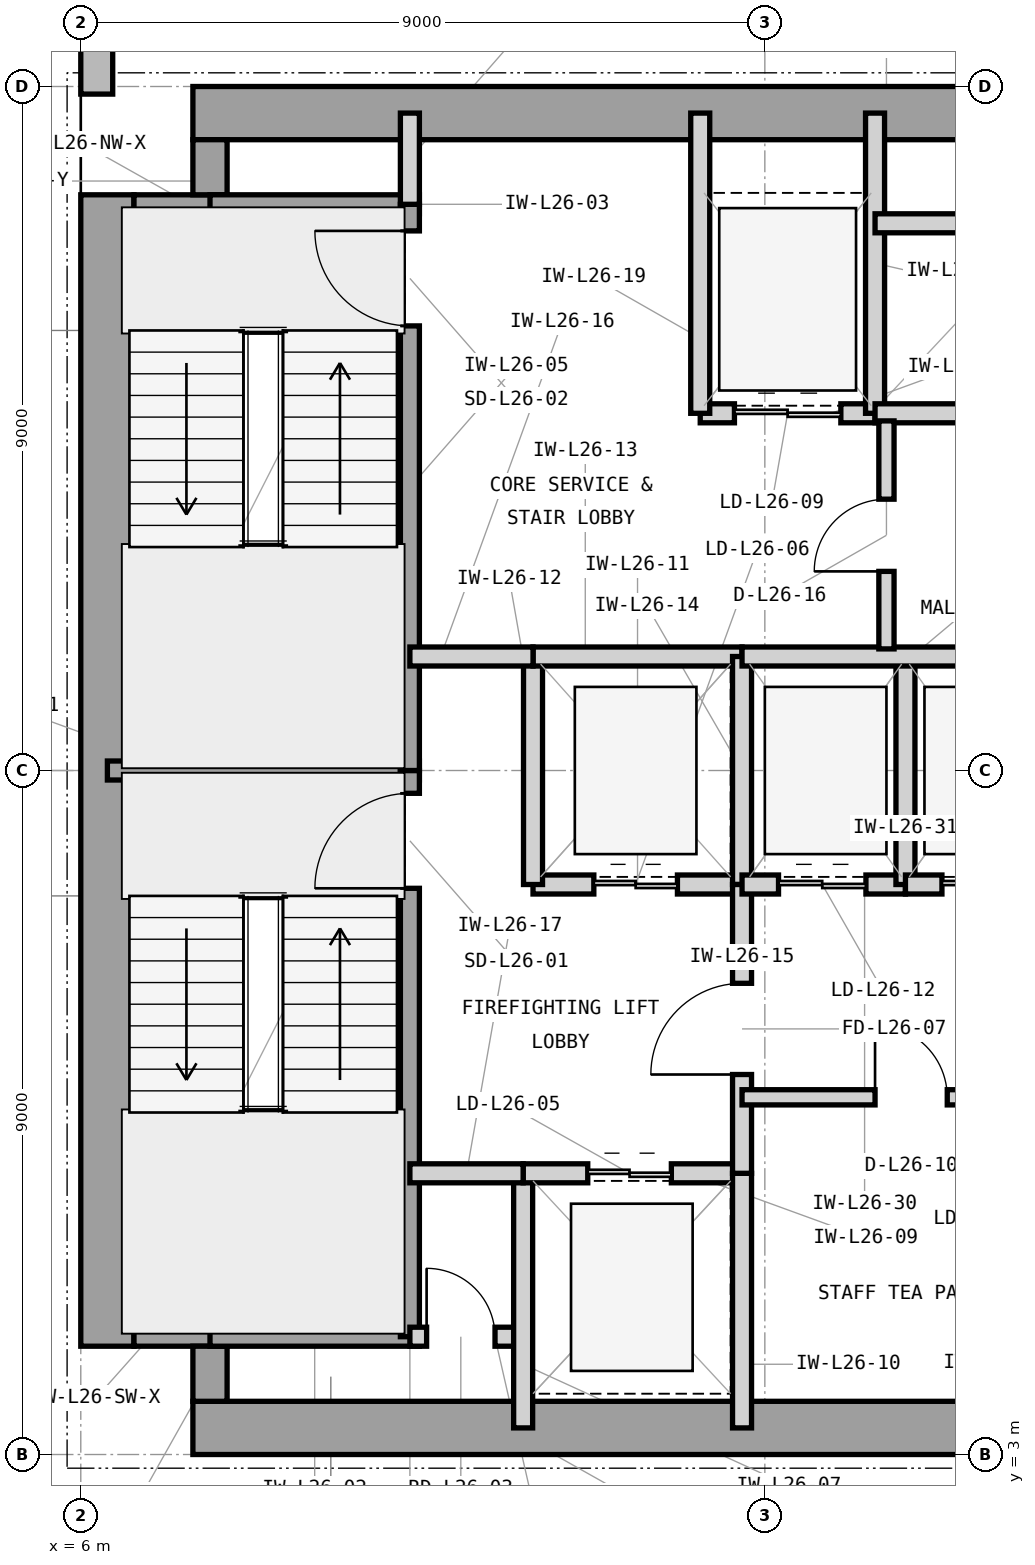
"""IFC4 building model, lengths in metres.
Left out: names, types, materials, properties, quantities, classifications, styles, units other than length and angle.
Written with IfcOpenShell. Run it as: python <this file> out.ifc"""

import sys

from ifc_helpers import new_model, si_unit, direction, frame, frame_2d, origin, place, context, subcontext, project, spatial, rectangle, extrude, element, fill, save


model = new_model("IFC4")
c1 = context("Model", 3, precision=1e-05, world=origin(), true_north=direction((0.0, 1.0)))
c2 = subcontext(c1, "Body", "Model", "MODEL_VIEW")
j1 = project(units=[si_unit("LENGTHUNIT", "METRE"), si_unit("PLANEANGLEUNIT", "RADIAN")], contexts=[c1])
p1 = place(None, origin())
s1 = spatial("IfcSite", under=j1, at=p1, CompositionType="ELEMENT")
p2 = place(p1, origin())
s2 = spatial("IfcBuilding", under=s1, at=p2, CompositionType="ELEMENT")
p3 = place(p2, frame((0.0, 0.0, 112.8)))
s3 = spatial("IfcBuildingStorey", under=s2, at=p3, CompositionType="ELEMENT", Elevation=112.8)
p4 = place(p3, frame((7.475, 3.35, 0.0), z_axis=(0.0, 0.0, 1.0), x_axis=(1.0, 0.0, 0.0)))
e1 = element("IfcWall", 1, at=p4, inside=s3, PredefinedType="SHEAR", context=c2, shape_type="SweptSolid", body=[
    extrude(rectangle(XDim=16.525, YDim=0.7, at=frame_2d((8.262, 0.0))), origin(), (0.0, 0.0, 1.0), 3.9),
])
p5 = place(p3, frame((6.35, 4.425, 0.0), z_axis=(0.0, 0.0, 1.0), x_axis=(0.0, 1.0, 0.0)))
e2 = element("IfcWall", 2, at=p5, inside=s3, PredefinedType="SHEAR", context=c2, shape_type="SweptSolid", body=[
    extrude(rectangle(XDim=15.15, YDim=0.7, at=frame_2d((7.575, 0.0))), origin(), (0.0, 0.0, 1.0), 3.9),
])
p6 = place(p3, frame((7.475, 20.65, 0.0), z_axis=(0.0, 0.0, 1.0), x_axis=(1.0, 0.0, 0.0)))
e3 = element("IfcWall", 3, at=p6, inside=s3, PredefinedType="SHEAR", context=c2, shape_type="SweptSolid", body=[
    extrude(rectangle(XDim=12.325, YDim=0.7, at=frame_2d((6.163, 0.0))), origin(), (0.0, 0.0, 1.0), 3.9),
])
p7 = place(p3, frame((6.7, 4.65, 0.0), z_axis=(0.0, 0.0, 1.0), x_axis=(1.0, 0.0, 0.0)))
e4 = element("IfcWall", 4, at=p7, inside=s3, PredefinedType="SHEAR", context=c2, shape_type="SweptSolid", body=[
    extrude(rectangle(XDim=1.225, YDim=0.45, at=frame_2d((0.613, 0.0))), origin(), (0.0, 0.0, 1.0), 3.9),
])
p8 = place(p3, frame((7.7, 3.7, 0.0), z_axis=(0.0, 0.0, 1.0), x_axis=(0.0, 1.0, 0.0)))
e5 = element("IfcWall", 5, at=p8, inside=s3, PredefinedType="SHEAR", context=c2, shape_type="SweptSolid", body=[
    extrude(rectangle(XDim=0.725, YDim=0.45, at=frame_2d((0.363, 0.0))), origin(), (0.0, 0.0, 1.0), 3.9),
])
p9 = place(p3, frame((6.7, 19.35, 0.0), z_axis=(0.0, 0.0, 1.0), x_axis=(1.0, 0.0, 0.0)))
e6 = element("IfcWall", 6, at=p9, inside=s3, PredefinedType="SHEAR", context=c2, shape_type="SweptSolid", body=[
    extrude(rectangle(XDim=1.225, YDim=0.45, at=frame_2d((0.613, 0.0))), origin(), (0.0, 0.0, 1.0), 3.9),
])
p10 = place(p3, frame((7.7, 19.575, 0.0), z_axis=(0.0, 0.0, 1.0), x_axis=(0.0, 1.0, 0.0)))
e7 = element("IfcWall", 7, at=p10, inside=s3, PredefinedType="SHEAR", context=c2, shape_type="SweptSolid", body=[
    extrude(rectangle(XDim=0.725, YDim=0.45, at=frame_2d((0.363, 0.0))), origin(), (0.0, 0.0, 1.0), 3.9),
])
p11 = place(p3, frame((6.21, 46.4, 0.0), z_axis=(0.0, 0.0, 1.0), x_axis=(0.0, -1.0, 0.0)))
e8 = element("IfcWall", 8, at=p11, inside=s3, PredefinedType="STANDARD", context=c2, shape_type="SweptSolid", body=[
    extrude(rectangle(XDim=25.5, YDim=0.42, at=frame_2d((12.75, 0.0))), origin(), (0.0, 0.0, 1.0), 3.7),
])
p12 = place(p11, frame((11.5, 0.0, 0.85)))
e9 = element("IfcOpeningElement", 9, at=p12, cuts=e8, PredefinedType="OPENING", context=c2, shape_type="SweptSolid", body=[
    extrude(rectangle(XDim=2.5, YDim=2.25, at=frame_2d((1.25, 1.125))), frame((0.0, 0.22, 0.0), z_axis=(0.0, -1.0, 0.0), x_axis=(1.0, 0.0, 0.0)), (0.0, 0.0, 1.0), 0.44),
])
p13 = place(p11, frame((8.336, 0.0, 0.85)))
e10 = element("IfcOpeningElement", 10, at=p13, cuts=e8, PredefinedType="OPENING", context=c2, shape_type="SweptSolid", body=[
    extrude(rectangle(XDim=1.2, YDim=2.25, at=frame_2d((0.6, 1.125))), frame((0.0, 0.22, 0.0), z_axis=(0.0, -1.0, 0.0), x_axis=(1.0, 0.0, 0.0)), (0.0, 0.0, 1.0), 0.44),
])
p14 = place(p3, frame((6.35, 12.0, 0.0), z_axis=(0.0, 0.0, 1.0), x_axis=(1.0, 0.0, 0.0)))
e11 = element("IfcWall", 11, at=p14, inside=s3, PredefinedType="SHEAR", context=c2, shape_type="SweptSolid", body=[
    extrude(rectangle(XDim=4.105, YDim=0.25, at=frame_2d((2.052, 0.0))), origin(), (0.0, 0.0, 1.0), 3.9),
])
for number, where, z_axis, x_axis in (
    (12, (7.7, 4.55, 0.0), (0.0, 0.0, 1.0), (1.0, 0.0, 0.0)),
    (13, (7.7, 19.45, 0.0), (0.0, 0.0, 1.0), (1.0, 0.0, 0.0)),
):
    element("IfcWall", number, at=place(p3, frame(where, z_axis=z_axis, x_axis=x_axis)), inside=s3, PredefinedType="SHEAR", context=c2, shape_type="SweptSolid", body=[
        extrude(rectangle(XDim=2.755, YDim=0.25, at=frame_2d((1.377, 0.0))), origin(), (0.0, 0.0, 1.0), 3.9),
    ])
p15 = place(p3, frame((10.33, 4.55, 0.0), z_axis=(0.0, 0.0, 1.0), x_axis=(0.0, 1.0, 0.0)))
e14 = element("IfcWall", 14, at=p15, inside=s3, PredefinedType="SHEAR", context=c2, shape_type="SweptSolid", body=[
    extrude(rectangle(XDim=7.45, YDim=0.25, at=frame_2d((3.725, 0.0))), origin(), (0.0, 0.0, 1.0), 3.9),
])
p16 = place(p15, frame((5.9, 0.0, 0.0)))
e15 = element("IfcOpeningElement", 15, at=p16, cuts=e14, PredefinedType="OPENING", context=c2, shape_type="SweptSolid", body=[
    extrude(rectangle(XDim=1.25, YDim=2.2, at=frame_2d((0.625, 1.1))), frame((0.0, 0.135, 0.0), z_axis=(0.0, -1.0, 0.0), x_axis=(1.0, 0.0, 0.0)), (0.0, 0.0, 1.0), 0.27),
])
p17 = place(p3, frame((10.33, 12.0, 0.0), z_axis=(0.0, 0.0, 1.0), x_axis=(0.0, 1.0, 0.0)))
e16 = element("IfcWall", 16, at=p17, inside=s3, PredefinedType="SHEAR", context=c2, shape_type="SweptSolid", body=[
    extrude(rectangle(XDim=7.45, YDim=0.25, at=frame_2d((3.725, 0.0))), origin(), (0.0, 0.0, 1.0), 3.9),
])
p18 = place(p17, frame((5.85, 0.0, 0.0)))
e17 = element("IfcOpeningElement", 17, at=p18, cuts=e16, PredefinedType="OPENING", context=c2, shape_type="SweptSolid", body=[
    extrude(rectangle(XDim=1.25, YDim=2.2, at=frame_2d((0.625, 1.1))), frame((0.0, 0.135, 0.0), z_axis=(0.0, -1.0, 0.0), x_axis=(1.0, 0.0, 0.0)), (0.0, 0.0, 1.0), 0.27),
])
p19 = place(p3, frame((10.33, 4.55, 0.0), z_axis=(0.0, 0.0, 1.0), x_axis=(1.0, 0.0, 0.0)))
e18 = element("IfcWall", 18, at=p19, inside=s3, PredefinedType="PARTITIONING", context=c2, shape_type="SweptSolid", body=[
    extrude(rectangle(XDim=1.49, YDim=0.25, at=frame_2d((0.745, 0.0))), origin(), (0.0, 0.0, 1.0), 3.69),
])
p20 = place(p19, frame((0.22, 0.0, 0.0)))
e19 = element("IfcOpeningElement", 19, at=p20, cuts=e18, PredefinedType="OPENING", context=c2, shape_type="SweptSolid", body=[
    extrude(rectangle(XDim=0.9, YDim=2.1, at=frame_2d((0.45, 1.05))), frame((0.0, 0.135, 0.0), z_axis=(0.0, -1.0, 0.0), x_axis=(1.0, 0.0, 0.0)), (0.0, 0.0, 1.0), 0.27),
])
p21 = place(p3, frame((11.82, 3.35, 0.0), z_axis=(0.0, 0.0, 1.0), x_axis=(0.0, 1.0, 0.0)))
e20 = element("IfcWall", 20, at=p21, inside=s3, PredefinedType="PARTITIONING", context=c2, shape_type="SweptSolid", body=[
    extrude(rectangle(XDim=3.35, YDim=0.25, at=frame_2d((1.675, 0.0))), origin(), (0.0, 0.0, 1.0), 3.69),
])
p22 = place(p3, frame((10.33, 19.45, 0.0), z_axis=(0.0, 0.0, 1.0), x_axis=(0.0, 1.0, 0.0)))
e21 = element("IfcWall", 21, at=p22, inside=s3, PredefinedType="PARTITIONING", context=c2, shape_type="SweptSolid", body=[
    extrude(rectangle(XDim=1.2, YDim=0.25, at=frame_2d((0.6, 0.0))), origin(), (0.0, 0.0, 1.0), 2.917),
])
p23 = place(p3, frame((11.82, 6.7, 0.0), z_axis=(0.0, 0.0, 1.0), x_axis=(1.0, 0.0, 0.0)))
e22 = element("IfcWall", 22, at=p23, inside=s3, PredefinedType="PARTITIONING", context=c2, shape_type="SweptSolid", body=[
    extrude(rectangle(XDim=2.88, YDim=0.25, at=frame_2d((1.44, 0.0))), origin(), (0.0, 0.0, 1.0), 3.227),
])
p24 = place(p23, frame((0.85, 0.0, 0.0)))
e23 = element("IfcOpeningElement", 23, at=p24, cuts=e22, PredefinedType="OPENING", context=c2, shape_type="SweptSolid", body=[
    extrude(rectangle(XDim=1.1, YDim=2.25, at=frame_2d((0.55, 1.125))), frame((0.0, 0.135, 0.0), z_axis=(0.0, -1.0, 0.0), x_axis=(1.0, 0.0, 0.0)), (0.0, 0.0, 1.0), 0.27),
])
p25 = place(p3, frame((14.7, 3.35, 0.0), z_axis=(0.0, 0.0, 1.0), x_axis=(0.0, 1.0, 0.0)))
e24 = element("IfcWall", 24, at=p25, inside=s3, PredefinedType="PARTITIONING", context=c2, shape_type="SweptSolid", body=[
    extrude(rectangle(XDim=3.35, YDim=0.25, at=frame_2d((1.675, 0.0))), origin(), (0.0, 0.0, 1.0), 3.69),
])
p26 = place(p3, frame((11.95, 10.5, 0.0), z_axis=(0.0, 0.0, 1.0), x_axis=(1.0, 0.0, 0.0)))
e25 = element("IfcWall", 25, at=p26, inside=s3, PredefinedType="PARTITIONING", context=c2, shape_type="SweptSolid", body=[
    extrude(rectangle(XDim=2.75, YDim=0.25, at=frame_2d((1.375, 0.0))), origin(), (0.0, 0.0, 1.0), 3.227),
])
p27 = place(p26, frame((0.8, 0.0, 0.0)))
e26 = element("IfcOpeningElement", 26, at=p27, cuts=e25, PredefinedType="OPENING", context=c2, shape_type="SweptSolid", body=[
    extrude(rectangle(XDim=1.1, YDim=2.25, at=frame_2d((0.55, 1.125))), frame((0.0, 0.135, 0.0), z_axis=(0.0, -1.0, 0.0), x_axis=(1.0, 0.0, 0.0)), (0.0, 0.0, 1.0), 0.27),
])
p28 = place(p3, frame((11.95, 10.5, 0.0), z_axis=(0.0, 0.0, 1.0), x_axis=(0.0, 1.0, 0.0)))
e27 = element("IfcWall", 27, at=p28, inside=s3, PredefinedType="PARTITIONING", context=c2, shape_type="SweptSolid", body=[
    extrude(rectangle(XDim=3.0, YDim=0.25, at=frame_2d((1.5, 0.0))), origin(), (0.0, 0.0, 1.0), 3.69),
])
p29 = place(p3, frame((11.95, 13.5, 0.0), z_axis=(0.0, 0.0, 1.0), x_axis=(1.0, 0.0, 0.0)))
e28 = element("IfcWall", 28, at=p29, inside=s3, PredefinedType="PARTITIONING", context=c2, shape_type="SweptSolid", body=[
    extrude(rectangle(XDim=2.75, YDim=0.25, at=frame_2d((1.375, 0.0))), origin(), (0.0, 0.0, 1.0), 3.227),
])
p30 = place(p3, frame((14.7, 10.5, 0.0), z_axis=(0.0, 0.0, 1.0), x_axis=(0.0, 1.0, 0.0)))
e29 = element("IfcWall", 29, at=p30, inside=s3, PredefinedType="PARTITIONING", context=c2, shape_type="SweptSolid", body=[
    extrude(rectangle(XDim=3.0, YDim=0.25, at=frame_2d((1.5, 0.0))), origin(), (0.0, 0.0, 1.0), 3.69),
])
p31 = place(p3, frame((14.7, 6.7, 0.0), z_axis=(0.0, 0.0, 1.0), x_axis=(0.0, 1.0, 0.0)))
e30 = element("IfcWall", 30, at=p31, inside=s3, PredefinedType="PARTITIONING", context=c2, shape_type="SweptSolid", body=[
    extrude(rectangle(XDim=3.8, YDim=0.25, at=frame_2d((1.9, 0.0))), origin(), (0.0, 0.0, 1.0), 3.69),
])
p32 = place(p31, frame((1.3, 0.0, 0.0)))
e31 = element("IfcOpeningElement", 31, at=p32, cuts=e30, PredefinedType="OPENING", context=c2, shape_type="SweptSolid", body=[
    extrude(rectangle(XDim=1.2, YDim=2.2, at=frame_2d((0.6, 1.1))), frame((0.0, 0.135, 0.0), z_axis=(0.0, -1.0, 0.0), x_axis=(1.0, 0.0, 0.0)), (0.0, 0.0, 1.0), 0.27),
])
p33 = place(p3, frame((10.33, 13.5, 0.0), z_axis=(0.0, 0.0, 1.0), x_axis=(1.0, 0.0, 0.0)))
e32 = element("IfcWall", 32, at=p33, inside=s3, PredefinedType="PARTITIONING", context=c2, shape_type="SweptSolid", body=[
    extrude(rectangle(XDim=1.62, YDim=0.25, at=frame_2d((0.81, 0.0))), origin(), (0.0, 0.0, 1.0), 3.227),
])
p34 = place(p3, frame((10.33, 6.7, 0.0), z_axis=(0.0, 0.0, 1.0), x_axis=(1.0, 0.0, 0.0)))
e33 = element("IfcWall", 33, at=p34, inside=s3, PredefinedType="PARTITIONING", context=c2, shape_type="SweptSolid", body=[
    extrude(rectangle(XDim=1.49, YDim=0.25, at=frame_2d((0.745, 0.0))), origin(), (0.0, 0.0, 1.0), 3.227),
])
p35 = place(p3, frame((14.15, 16.7, 0.0), z_axis=(0.0, 0.0, 1.0), x_axis=(1.0, 0.0, 0.0)))
e34 = element("IfcWall", 34, at=p35, inside=s3, PredefinedType="PARTITIONING", context=c2, shape_type="SweptSolid", body=[
    extrude(rectangle(XDim=2.3, YDim=0.25, at=frame_2d((1.15, 0.0))), origin(), (0.0, 0.0, 1.0), 3.227),
])
p36 = place(p35, frame((0.45, 0.0, 0.0)))
e35 = element("IfcOpeningElement", 35, at=p36, cuts=e34, PredefinedType="OPENING", context=c2, shape_type="SweptSolid", body=[
    extrude(rectangle(XDim=1.4, YDim=2.35, at=frame_2d((0.7, 1.175))), frame((0.0, 0.135, 0.0), z_axis=(0.0, -1.0, 0.0), x_axis=(1.0, 0.0, 0.0)), (0.0, 0.0, 1.0), 0.27),
])
for number, where, z_axis, x_axis in (
    (36, (14.15, 16.7, 0.0), (0.0, 0.0, 1.0), (0.0, 1.0, 0.0)),
    (37, (16.45, 16.7, 0.0), (0.0, 0.0, 1.0), (0.0, 1.0, 0.0)),
):
    element("IfcWall", number, at=place(p3, frame(where, z_axis=z_axis, x_axis=x_axis)), inside=s3, PredefinedType="PARTITIONING", context=c2, shape_type="SweptSolid", body=[
        extrude(rectangle(XDim=3.95, YDim=0.25, at=frame_2d((1.975, 0.0))), origin(), (0.0, 0.0, 1.0), 3.69),
    ])
p37 = place(p3, frame((16.45, 16.7, 0.0), z_axis=(0.0, 0.0, 1.0), x_axis=(1.0, 0.0, 0.0)))
e38 = element("IfcWall", 38, at=p37, inside=s3, PredefinedType="PARTITIONING", context=c2, shape_type="SweptSolid", body=[
    extrude(rectangle(XDim=2.3, YDim=0.25, at=frame_2d((1.15, 0.0))), origin(), (0.0, 0.0, 1.0), 3.227),
])
p38 = place(p3, frame((16.45, 19.2, 0.0), z_axis=(0.0, 0.0, 1.0), x_axis=(1.0, 0.0, 0.0)))
e39 = element("IfcWall", 39, at=p38, inside=s3, PredefinedType="PARTITIONING", context=c2, shape_type="SweptSolid", body=[
    extrude(rectangle(XDim=7.2, YDim=0.25, at=frame_2d((3.6, 0.0))), origin(), (0.0, 0.0, 1.0), 3.69),
])
p39 = place(p3, frame((14.7, 7.7, 0.0), z_axis=(0.0, 0.0, 1.0), x_axis=(1.0, 0.0, 0.0)))
e40 = element("IfcWall", 40, at=p39, inside=s3, PredefinedType="PARTITIONING", context=c2, shape_type="SweptSolid", body=[
    extrude(rectangle(XDim=4.45, YDim=0.2, at=frame_2d((2.225, 0.0))), origin(), (0.0, 0.0, 1.0), 3.69),
])
p40 = place(p39, frame((1.75, 0.0, 0.0)))
e41 = element("IfcOpeningElement", 41, at=p40, cuts=e40, PredefinedType="OPENING", context=c2, shape_type="SweptSolid", body=[
    extrude(rectangle(XDim=0.95, YDim=2.1, at=frame_2d((0.475, 1.05))), frame((0.0, 0.11, 0.0), z_axis=(0.0, -1.0, 0.0), x_axis=(1.0, 0.0, 0.0)), (0.0, 0.0, 1.0), 0.22),
])
p41 = place(p3, frame((14.7, 10.5, 0.0), z_axis=(0.0, 0.0, 1.0), x_axis=(1.0, 0.0, 0.0)))
e42 = element("IfcWall", 42, at=p41, inside=s3, PredefinedType="PARTITIONING", context=c2, shape_type="SweptSolid", body=[
    extrude(rectangle(XDim=2.15, YDim=0.25, at=frame_2d((1.075, 0.0))), origin(), (0.0, 0.0, 1.0), 3.227),
])
p42 = place(p41, frame((0.48, 0.0, 0.0)))
e43 = element("IfcOpeningElement", 43, at=p42, cuts=e42, PredefinedType="OPENING", context=c2, shape_type="SweptSolid", body=[
    extrude(rectangle(XDim=1.15, YDim=2.25, at=frame_2d((0.575, 1.125))), frame((0.0, 0.135, 0.0), z_axis=(0.0, -1.0, 0.0), x_axis=(1.0, 0.0, 0.0)), (0.0, 0.0, 1.0), 0.27),
])
p43 = place(p3, frame((16.85, 10.5, 0.0), z_axis=(0.0, 0.0, 1.0), x_axis=(0.0, 1.0, 0.0)))
e44 = element("IfcWall", 44, at=p43, inside=s3, PredefinedType="PARTITIONING", context=c2, shape_type="SweptSolid", body=[
    extrude(rectangle(XDim=3.0, YDim=0.25, at=frame_2d((1.5, 0.0))), origin(), (0.0, 0.0, 1.0), 3.69),
])
p44 = place(p3, frame((16.85, 10.5, 0.0), z_axis=(0.0, 0.0, 1.0), x_axis=(1.0, 0.0, 0.0)))
e45 = element("IfcWall", 45, at=p44, inside=s3, PredefinedType="PARTITIONING", context=c2, shape_type="SweptSolid", body=[
    extrude(rectangle(XDim=2.1, YDim=0.25, at=frame_2d((1.05, 0.0))), origin(), (0.0, 0.0, 1.0), 3.227),
])
p45 = place(p44, frame((0.48, 0.0, 0.0)))
e46 = element("IfcOpeningElement", 46, at=p45, cuts=e45, PredefinedType="OPENING", context=c2, shape_type="SweptSolid", body=[
    extrude(rectangle(XDim=1.15, YDim=2.25, at=frame_2d((0.575, 1.125))), frame((0.0, 0.135, 0.0), z_axis=(0.0, -1.0, 0.0), x_axis=(1.0, 0.0, 0.0)), (0.0, 0.0, 1.0), 0.27),
])
p46 = place(p3, frame((14.7, 13.5, 0.0), z_axis=(0.0, 0.0, 1.0), x_axis=(1.0, 0.0, 0.0)))
e47 = element("IfcWall", 47, at=p46, inside=s3, PredefinedType="PARTITIONING", context=c2, shape_type="SweptSolid", body=[
    extrude(rectangle(XDim=8.95, YDim=0.25, at=frame_2d((4.475, 0.0))), origin(), (0.0, 0.0, 1.0), 3.227),
])
p47 = place(p3, frame((16.6, 13.6, 0.0), z_axis=(0.0, 0.0, 1.0), x_axis=(0.0, 1.0, 0.0)))
e48 = element("IfcWall", 48, at=p47, inside=s3, PredefinedType="PARTITIONING", context=c2, shape_type="SweptSolid", body=[
    extrude(rectangle(XDim=3.0, YDim=0.2, at=frame_2d((1.5, 0.0))), origin(), (0.0, 0.0, 1.0), 3.69),
])
p48 = place(p47, frame((1.02, 0.0, 0.0)))
e49 = element("IfcOpeningElement", 49, at=p48, cuts=e48, PredefinedType="OPENING", context=c2, shape_type="SweptSolid", body=[
    extrude(rectangle(XDim=0.95, YDim=2.1, at=frame_2d((0.475, 1.05))), frame((0.0, 0.11, 0.0), z_axis=(0.0, -1.0, 0.0), x_axis=(1.0, 0.0, 0.0)), (0.0, 0.0, 1.0), 0.22),
])
p49 = place(p16, origin())
e50 = element("IfcDoor", 50, at=p49, inside=s3, OperationType="SINGLE_SWING_LEFT", PredefinedType="DOOR", context=c2, shape_type="SweptSolid", body=[
    extrude(rectangle(XDim=1.25, YDim=2.2, at=frame_2d((0.625, 1.1))), frame((0.0, 0.025, 0.0), z_axis=(0.0, -1.0, 0.0), x_axis=(1.0, 0.0, 0.0)), (0.0, 0.0, 1.0), 0.05),
])
fill(e15, e50)
p50 = place(p18, origin())
e51 = element("IfcDoor", 51, at=p50, inside=s3, OperationType="SINGLE_SWING_RIGHT", PredefinedType="DOOR", context=c2, shape_type="SweptSolid", body=[
    extrude(rectangle(XDim=1.25, YDim=2.2, at=frame_2d((0.625, 1.1))), frame((0.0, 0.025, 0.0), z_axis=(0.0, -1.0, 0.0), x_axis=(1.0, 0.0, 0.0)), (0.0, 0.0, 1.0), 0.05),
])
fill(e17, e51)
p51 = place(p20, origin())
e52 = element("IfcDoor", 52, at=p51, inside=s3, OperationType="SINGLE_SWING_LEFT", PredefinedType="TRAPDOOR", context=c2, shape_type="SweptSolid", body=[
    extrude(rectangle(XDim=0.9, YDim=2.1, at=frame_2d((0.45, 1.05))), frame((0.0, 0.025, 0.0), z_axis=(0.0, -1.0, 0.0), x_axis=(1.0, 0.0, 0.0)), (0.0, 0.0, 1.0), 0.05),
])
fill(e19, e52)
p52 = place(p24, origin())
e53 = element("IfcDoor", 53, at=p52, inside=s3, OperationType="DOUBLE_DOOR_SLIDING", PredefinedType="DOOR", context=c2, shape_type="SweptSolid", body=[
    extrude(rectangle(XDim=1.1, YDim=2.25, at=frame_2d((0.55, 1.125))), frame((0.0, 0.025, 0.0), z_axis=(0.0, -1.0, 0.0), x_axis=(1.0, 0.0, 0.0)), (0.0, 0.0, 1.0), 0.05),
])
fill(e23, e53)
p53 = place(p27, origin())
e54 = element("IfcDoor", 54, at=p53, inside=s3, OperationType="DOUBLE_DOOR_SLIDING", PredefinedType="DOOR", context=c2, shape_type="SweptSolid", body=[
    extrude(rectangle(XDim=1.1, YDim=2.25, at=frame_2d((0.55, 1.125))), frame((0.0, 0.025, 0.0), z_axis=(0.0, -1.0, 0.0), x_axis=(1.0, 0.0, 0.0)), (0.0, 0.0, 1.0), 0.05),
])
fill(e26, e54)
p54 = place(p32, origin())
e55 = element("IfcDoor", 55, at=p54, inside=s3, OperationType="SINGLE_SWING_LEFT", PredefinedType="DOOR", context=c2, shape_type="SweptSolid", body=[
    extrude(rectangle(XDim=1.2, YDim=2.2, at=frame_2d((0.6, 1.1))), frame((0.0, 0.025, 0.0), z_axis=(0.0, -1.0, 0.0), x_axis=(1.0, 0.0, 0.0)), (0.0, 0.0, 1.0), 0.05),
])
fill(e31, e55)
p55 = place(p36, origin())
e56 = element("IfcDoor", 56, at=p55, inside=s3, OperationType="DOUBLE_DOOR_SLIDING", PredefinedType="DOOR", context=c2, shape_type="SweptSolid", body=[
    extrude(rectangle(XDim=1.4, YDim=2.35, at=frame_2d((0.7, 1.175))), frame((0.0, 0.025, 0.0), z_axis=(0.0, -1.0, 0.0), x_axis=(1.0, 0.0, 0.0)), (0.0, 0.0, 1.0), 0.05),
])
fill(e35, e56)
p56 = place(p40, origin())
e57 = element("IfcDoor", 57, at=p56, inside=s3, OperationType="SINGLE_SWING_LEFT", PredefinedType="DOOR", context=c2, shape_type="SweptSolid", body=[
    extrude(rectangle(XDim=0.95, YDim=2.1, at=frame_2d((0.475, 1.05))), frame((0.0, 0.025, 0.0), z_axis=(0.0, -1.0, 0.0), x_axis=(1.0, 0.0, 0.0)), (0.0, 0.0, 1.0), 0.05),
])
fill(e41, e57)
p57 = place(p42, origin())
e58 = element("IfcDoor", 58, at=p57, inside=s3, OperationType="DOUBLE_DOOR_SLIDING", PredefinedType="DOOR", context=c2, shape_type="SweptSolid", body=[
    extrude(rectangle(XDim=1.15, YDim=2.25, at=frame_2d((0.575, 1.125))), frame((0.0, 0.025, 0.0), z_axis=(0.0, -1.0, 0.0), x_axis=(1.0, 0.0, 0.0)), (0.0, 0.0, 1.0), 0.05),
])
fill(e43, e58)
p58 = place(p45, origin())
e59 = element("IfcDoor", 59, at=p58, inside=s3, OperationType="DOUBLE_DOOR_SLIDING", PredefinedType="DOOR", context=c2, shape_type="SweptSolid", body=[
    extrude(rectangle(XDim=1.15, YDim=2.25, at=frame_2d((0.575, 1.125))), frame((0.0, 0.025, 0.0), z_axis=(0.0, -1.0, 0.0), x_axis=(1.0, 0.0, 0.0)), (0.0, 0.0, 1.0), 0.05),
])
fill(e46, e59)
p59 = place(p48, origin())
e60 = element("IfcDoor", 60, at=p59, inside=s3, OperationType="SINGLE_SWING_LEFT", PredefinedType="DOOR", context=c2, shape_type="SweptSolid", body=[
    extrude(rectangle(XDim=0.95, YDim=2.1, at=frame_2d((0.475, 1.05))), frame((0.0, 0.025, 0.0), z_axis=(0.0, -1.0, 0.0), x_axis=(1.0, 0.0, 0.0)), (0.0, 0.0, 1.0), 0.05),
])
fill(e49, e60)
save(model, sys.argv[1])
